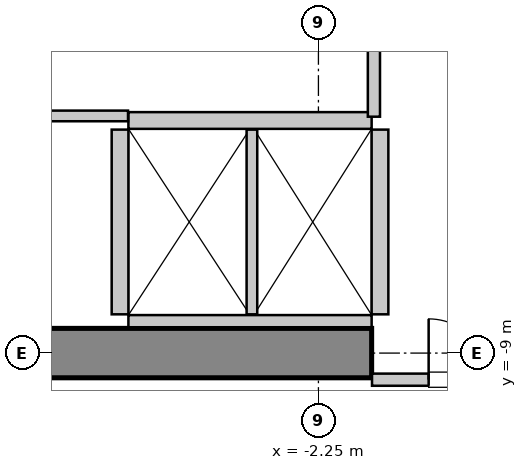
"""IFC4 building model, lengths in metres.
Left out: names, types, materials, properties, quantities, classifications, styles, units other than length and angle.
Written with IfcOpenShell. Run it as: python <this file> out.ifc"""

import sys

from ifc_helpers import new_model, si_unit, direction, frame, frame_2d, origin, place, context, subcontext, project, spatial, rectangle, extrude, source, transform, mapped, element, fill, save


model = new_model("IFC4")
c1 = context("Model", 3, precision=1e-05, world=origin(), true_north=direction((0.0, 1.0)))
c2 = subcontext(c1, "Body", "Model", "MODEL_VIEW")
j1 = project(units=[si_unit("LENGTHUNIT", "METRE"), si_unit("PLANEANGLEUNIT", "RADIAN")], contexts=[c1])
p1 = place(None, origin())
s1 = spatial("IfcSite", under=j1, at=p1, CompositionType="ELEMENT")
p2 = place(p1, origin())
s2 = spatial("IfcBuilding", under=s1, at=p2, CompositionType="ELEMENT")
p3 = place(p2, frame((0.0, 0.0, 36.8)))
s3 = spatial("IfcBuildingStorey", under=s2, at=p3, CompositionType="ELEMENT", Elevation=36.8)
m1 = source(origin(), c2, "Body", "SweptSolid", [
    extrude(rectangle(XDim=10.025, YDim=0.65, at=frame_2d((5.012, 0.0))), origin(), (0.0, 0.0, 1.0), 3.8),
])
p4 = place(p3, frame((-11.575, -9.0, 0.0), z_axis=(0.0, 0.0, 1.0), x_axis=(1.0, 0.0, 0.0)))
e1 = element("IfcWall", 1, at=p4, inside=s3, PredefinedType="SHEAR", context=c2, shape_type="MappedRepresentation", body=[
    mapped(m1, transform((0.0, 0.0, 0.0), x_axis=(1.0, 0.0, 0.0), y_axis=(0.0, 1.0, 0.0), z_axis=(0.0, 0.0, 1.0), scale=1.0)),
])
m2 = source(origin(), c2, "Body", "SweptSolid", [
    extrude(rectangle(XDim=3.2, YDim=0.22, at=frame_2d((1.6, 0.0))), origin(), (0.0, 0.0, 1.0), 3.535),
])
p5 = place(p3, frame((-1.55, -5.94, 0.0), z_axis=(0.0, 0.0, 1.0), x_axis=(-1.0, 0.0, 0.0)))
e2 = element("IfcWall", 2, at=p5, inside=s3, PredefinedType="SOLIDWALL", context=c2, shape_type="MappedRepresentation", body=[
    mapped(m2, transform((0.0, 0.0, 0.0), x_axis=(1.0, 0.0, 0.0), y_axis=(0.0, 1.0, 0.0), z_axis=(0.0, 0.0, 1.0), scale=1.0)),
])
m3 = source(origin(), c2, "Body", "SweptSolid", [
    extrude(rectangle(XDim=3.2, YDim=0.16, at=frame_2d((1.6, 0.0))), origin(), (0.0, 0.0, 1.0), 2.425),
])
p6 = place(p3, frame((-4.75, -8.58, 0.0), z_axis=(0.0, 0.0, 1.0), x_axis=(1.0, 0.0, 0.0)))
e3 = element("IfcWall", 3, at=p6, inside=s3, PredefinedType="PARTITIONING", context=c2, shape_type="MappedRepresentation", body=[
    mapped(m3, transform((0.0, 0.0, 0.0), x_axis=(1.0, 0.0, 0.0), y_axis=(0.0, 1.0, 0.0), z_axis=(0.0, 0.0, 1.0), scale=1.0)),
])
m4 = source(origin(), c2, "Body", "SweptSolid", [
    extrude(rectangle(XDim=2.43, YDim=0.22, at=frame_2d((1.215, 0.0))), origin(), (0.0, 0.0, 1.0), 3.535),
])
p7 = place(p3, frame((-4.86, -6.06, 0.0), z_axis=(0.0, 0.0, 1.0), x_axis=(0.0, -1.0, 0.0)))
e4 = element("IfcWall", 4, at=p7, inside=s3, PredefinedType="SOLIDWALL", context=c2, shape_type="MappedRepresentation", body=[
    mapped(m4, transform((0.0, 0.0, 0.0), x_axis=(1.0, 0.0, 0.0), y_axis=(0.0, 1.0, 0.0), z_axis=(0.0, 0.0, 1.0), scale=1.0)),
])
m5 = source(origin(), c2, "Body", "SweptSolid", [
    extrude(rectangle(XDim=2.43, YDim=0.14, at=frame_2d((1.215, 0.0))), origin(), (0.0, 0.0, 1.0), 3.535),
])
p8 = place(p3, frame((-3.125, -8.49, 0.0), z_axis=(0.0, 0.0, 1.0), x_axis=(0.0, 1.0, 0.0)))
e5 = element("IfcWall", 5, at=p8, inside=s3, PredefinedType="PARTITIONING", context=c2, shape_type="MappedRepresentation", body=[
    mapped(m5, transform((0.0, 0.0, 0.0), x_axis=(1.0, 0.0, 0.0), y_axis=(0.0, 1.0, 0.0), z_axis=(0.0, 0.0, 1.0), scale=1.0)),
])
p9 = place(p3, frame((-1.44, -8.49, 0.0), z_axis=(0.0, 0.0, 1.0), x_axis=(0.0, 1.0, 0.0)))
e6 = element("IfcWall", 6, at=p9, inside=s3, PredefinedType="SOLIDWALL", context=c2, shape_type="MappedRepresentation", body=[
    mapped(m4, transform((0.0, 0.0, 0.0), x_axis=(1.0, 0.0, 0.0), y_axis=(0.0, 1.0, 0.0), z_axis=(0.0, 0.0, 1.0), scale=1.0)),
])
m6 = source(origin(), c2, "Body", "SweptSolid", [
    extrude(rectangle(XDim=3.09, YDim=0.16, at=frame_2d((1.545, 0.0))), origin(), (0.0, 0.0, 1.0), 2.425),
])
p10 = place(p3, frame((-1.545, -9.35, 0.0), z_axis=(0.0, 0.0, 1.0), x_axis=(1.0, 0.0, 0.0)))
e7 = element("IfcWall", 7, at=p10, inside=s3, PredefinedType="PARTITIONING", context=c2, shape_type="MappedRepresentation", body=[
    mapped(m6, transform((0.0, 0.0, 0.0), x_axis=(1.0, 0.0, 0.0), y_axis=(0.0, 1.0, 0.0), z_axis=(0.0, 0.0, 1.0), scale=1.0)),
])
p11 = place(p10, frame((0.745, 0.0, 0.0)))
e8 = element("IfcOpeningElement", 8, at=p11, cuts=e7, PredefinedType="OPENING", context=c2, shape_type="SweptSolid", body=[
    extrude(rectangle(XDim=1.6, YDim=2.3, at=frame_2d((0.8, 1.15))), frame((0.0, 0.09, 0.0), z_axis=(0.0, -1.0, 0.0), x_axis=(1.0, 0.0, 0.0)), (0.0, 0.0, 1.0), 0.18),
])
m7 = source(origin(), c2, "Body", "SweptSolid", [
    extrude(rectangle(XDim=2.88, YDim=0.16, at=frame_2d((1.44, 0.0))), origin(), (0.0, 0.0, 1.0), 3.535),
])
p12 = place(p3, frame((-1.52, -5.89, 0.0), z_axis=(0.0, 0.0, 1.0), x_axis=(0.0, 1.0, 0.0)))
e9 = element("IfcWall", 9, at=p12, inside=s3, PredefinedType="PARTITIONING", context=c2, shape_type="MappedRepresentation", body=[
    mapped(m7, transform((0.0, 0.0, 0.0), x_axis=(1.0, 0.0, 0.0), y_axis=(0.0, 1.0, 0.0), z_axis=(0.0, 0.0, 1.0), scale=1.0)),
])
p13 = place(p12, frame((1.015, 0.0, 0.0)))
e10 = element("IfcOpeningElement", 10, at=p13, cuts=e9, PredefinedType="OPENING", context=c2, shape_type="SweptSolid", body=[
    extrude(rectangle(XDim=0.85, YDim=2.1, at=frame_2d((0.425, 1.05))), frame((0.0, 0.09, 0.0), z_axis=(0.0, -1.0, 0.0), x_axis=(1.0, 0.0, 0.0)), (0.0, 0.0, 1.0), 0.18),
])
m8 = source(origin(), c2, "Body", "SweptSolid", [
    extrude(rectangle(XDim=2.435, YDim=0.14, at=frame_2d((1.218, 0.0))), origin(), (0.0, 0.0, 1.0), 3.535),
])
p14 = place(p3, frame((-7.19, -5.88, 0.0), z_axis=(0.0, 0.0, 1.0), x_axis=(1.0, 0.0, 0.0)))
e11 = element("IfcWall", 11, at=p14, inside=s3, PredefinedType="PARTITIONING", context=c2, shape_type="MappedRepresentation", body=[
    mapped(m8, transform((0.0, 0.0, 0.0), x_axis=(1.0, 0.0, 0.0), y_axis=(0.0, 1.0, 0.0), z_axis=(0.0, 0.0, 1.0), scale=1.0)),
])
m9 = source(origin(), c2, "Body", "SweptSolid", [
    extrude(rectangle(XDim=1.6, YDim=2.3, at=frame_2d((0.8, 1.15))), frame((0.0, 0.025, 0.0), z_axis=(0.0, -1.0, 0.0), x_axis=(1.0, 0.0, 0.0)), (0.0, 0.0, 1.0), 0.05),
])
p15 = place(p11, origin())
e12 = element("IfcDoor", 12, at=p15, inside=s3, OperationType="DOUBLE_DOOR_SINGLE_SWING", PredefinedType="DOOR", context=c2, shape_type="MappedRepresentation", body=[
    mapped(m9, transform((0.0, 0.0, 0.0), x_axis=(1.0, 0.0, 0.0), y_axis=(0.0, 1.0, 0.0), z_axis=(0.0, 0.0, 1.0), scale=1.0)),
])
fill(e8, e12)
save(model, sys.argv[1])
